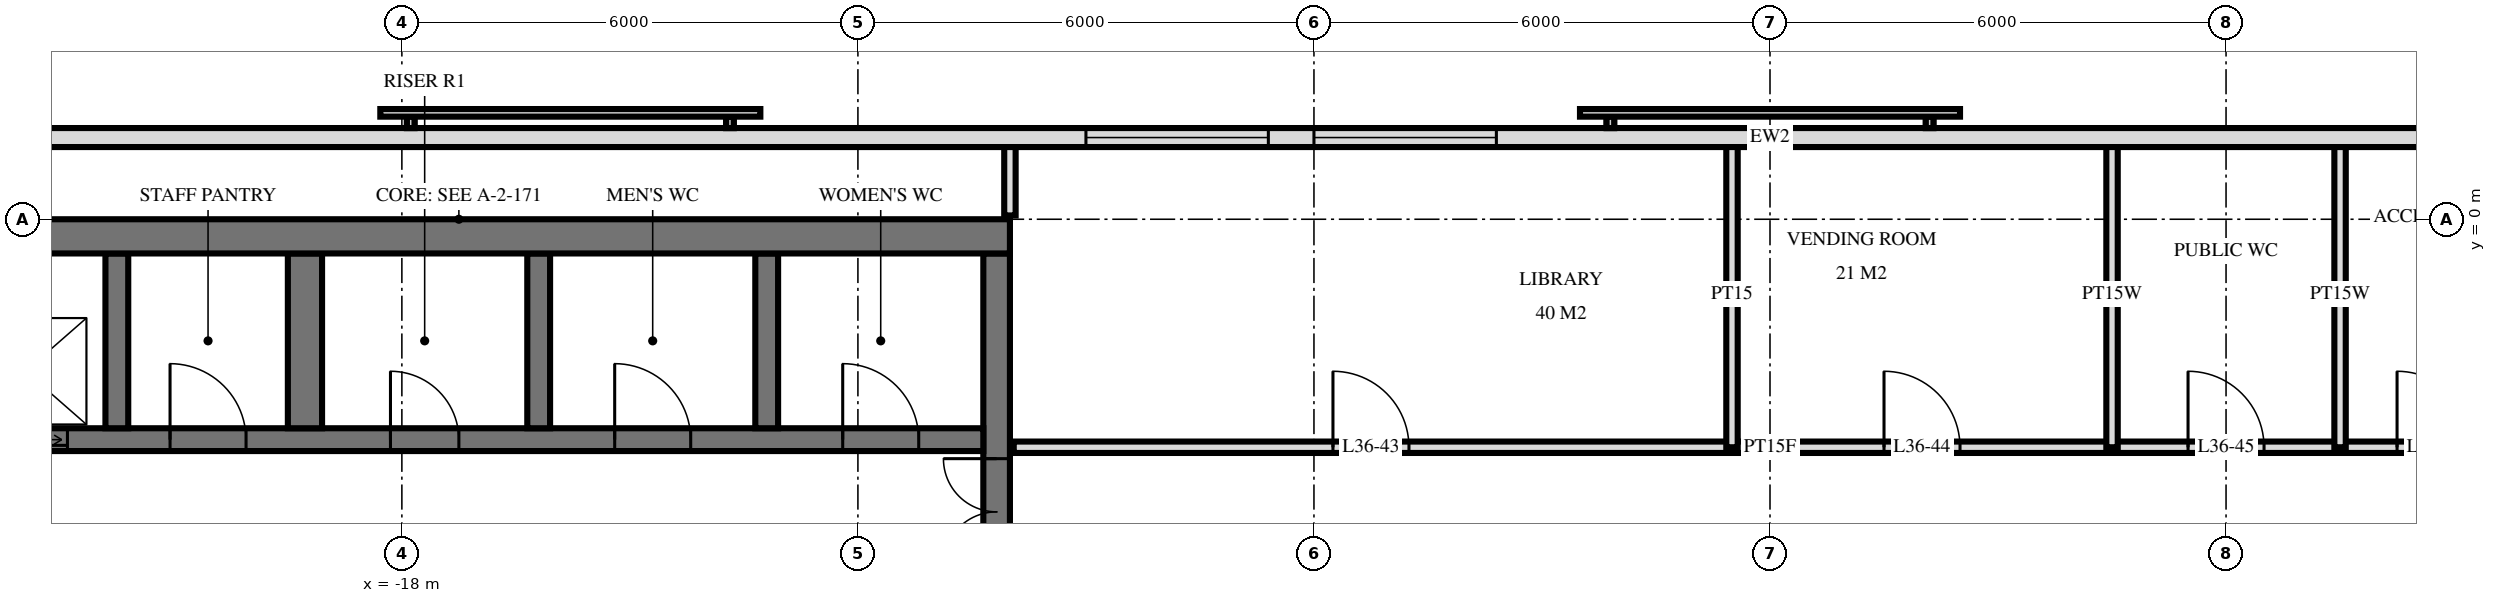
"""IFC4 building model, lengths in metres.
Left out: names, types, materials, properties, quantities, classifications, styles, units other than length and angle.
Written with IfcOpenShell. Run it as: python <this file> out.ifc"""

import sys

from ifc_helpers import new_model, si_unit, direction, frame, frame_2d, origin, place, context, subcontext, project, spatial, rectangle, extrude, element, fill, save


model = new_model("IFC4")
c1 = context("Model", 3, precision=1e-05, world=origin(), true_north=direction((0.0, 1.0)))
c2 = subcontext(c1, "Body", "Model", "MODEL_VIEW")
j1 = project(units=[si_unit("LENGTHUNIT", "METRE"), si_unit("PLANEANGLEUNIT", "RADIAN")], contexts=[c1])
p1 = place(None, origin())
s1 = spatial("IfcSite", under=j1, at=p1, CompositionType="ELEMENT")
p2 = place(p1, origin())
s2 = spatial("IfcBuilding", under=s1, at=p2, CompositionType="ELEMENT")
p3 = place(p2, frame((0.0, 0.0, 141.6)))
s3 = spatial("IfcBuildingStorey", under=s2, at=p3, CompositionType="ELEMENT", Elevation=141.6)
p4 = place(p3, frame((-24.5, -0.225, 0.0), z_axis=(0.0, 0.0, 1.0), x_axis=(1.0, 0.0, 0.0)))
e1 = element("IfcWall", 1, at=p4, inside=s3, PredefinedType="SHEAR", context=c2, shape_type="SweptSolid", body=[
    extrude(rectangle(XDim=14.5, YDim=0.45, at=frame_2d((7.25, 0.0))), origin(), (0.0, 0.0, 1.0), 3.6),
])
p5 = place(p3, frame((-10.175, -14.55, 0.0), z_axis=(0.0, 0.0, 1.0), x_axis=(0.0, 1.0, 0.0)))
e2 = element("IfcWall", 2, at=p5, inside=s3, PredefinedType="SHEAR", context=c2, shape_type="SweptSolid", body=[
    extrude(rectangle(XDim=14.1, YDim=0.35, at=frame_2d((7.05, 0.0))), origin(), (0.0, 0.0, 1.0), 3.6),
])
p6 = place(p5, frame((8.4, 0.0, 0.0)))
e3 = element("IfcOpeningElement", 3, at=p6, cuts=e2, PredefinedType="OPENING", context=c2, shape_type="SweptSolid", body=[
    extrude(rectangle(XDim=1.4, YDim=2.4, at=frame_2d((0.7, 1.2))), frame((0.0, 0.185, 0.0), z_axis=(0.0, -1.0, 0.0), x_axis=(1.0, 0.0, 0.0)), (0.0, 0.0, 1.0), 0.37),
])
p7 = place(p5, frame((10.0, 0.0, 0.0)))
e4 = element("IfcOpeningElement", 4, at=p7, cuts=e2, PredefinedType="OPENING", context=c2, shape_type="SweptSolid", body=[
    extrude(rectangle(XDim=1.4, YDim=2.4, at=frame_2d((0.7, 1.2))), frame((0.0, 0.185, 0.0), z_axis=(0.0, -1.0, 0.0), x_axis=(1.0, 0.0, 0.0)), (0.0, 0.0, 1.0), 0.37),
])
p8 = place(p5, frame((4.0, 0.0, 0.0)))
e5 = element("IfcOpeningElement", 5, at=p8, cuts=e2, PredefinedType="OPENING", context=c2, shape_type="SweptSolid", body=[
    extrude(rectangle(XDim=1.2, YDim=2.1, at=frame_2d((0.6, 1.05))), frame((0.0, 0.185, 0.0), z_axis=(0.0, -1.0, 0.0), x_axis=(1.0, 0.0, 0.0)), (0.0, 0.0, 1.0), 0.37),
])
p9 = place(p3, frame((-24.05, -2.9, 0.0), z_axis=(0.0, 0.0, 1.0), x_axis=(1.0, 0.0, 0.0)))
e6 = element("IfcWall", 6, at=p9, inside=s3, PredefinedType="SHEAR", context=c2, shape_type="SweptSolid", body=[
    extrude(rectangle(XDim=13.7, YDim=0.3, at=frame_2d((6.85, 0.0))), origin(), (0.0, 0.0, 1.0), 3.6),
])
p10 = place(p9, frame((0.55, 0.0, 0.0)))
e7 = element("IfcOpeningElement", 7, at=p10, cuts=e6, PredefinedType="OPENING", context=c2, shape_type="SweptSolid", body=[
    extrude(rectangle(XDim=1.1, YDim=2.1, at=frame_2d((0.55, 1.05))), frame((0.0, 0.16, 0.0), z_axis=(0.0, -1.0, 0.0), x_axis=(1.0, 0.0, 0.0)), (0.0, 0.0, 1.0), 0.32),
])
p11 = place(p9, frame((5.9, 0.0, 0.0)))
e8 = element("IfcOpeningElement", 8, at=p11, cuts=e6, PredefinedType="OPENING", context=c2, shape_type="SweptSolid", body=[
    extrude(rectangle(XDim=0.9, YDim=2.1, at=frame_2d((0.45, 1.05))), frame((0.0, 0.16, 0.0), z_axis=(0.0, -1.0, 0.0), x_axis=(1.0, 0.0, 0.0)), (0.0, 0.0, 1.0), 0.32),
])
p12 = place(p9, frame((11.85, 0.0, 0.0)))
e9 = element("IfcOpeningElement", 9, at=p12, cuts=e6, PredefinedType="OPENING", context=c2, shape_type="SweptSolid", body=[
    extrude(rectangle(XDim=1.0, YDim=2.1, at=frame_2d((0.5, 1.05))), frame((0.0, 0.16, 0.0), z_axis=(0.0, -1.0, 0.0), x_axis=(1.0, 0.0, 0.0)), (0.0, 0.0, 1.0), 0.32),
])
p13 = place(p9, frame((8.85, 0.0, 0.0)))
e10 = element("IfcOpeningElement", 10, at=p13, cuts=e6, PredefinedType="OPENING", context=c2, shape_type="SweptSolid", body=[
    extrude(rectangle(XDim=1.0, YDim=2.1, at=frame_2d((0.5, 1.05))), frame((0.0, 0.16, 0.0), z_axis=(0.0, -1.0, 0.0), x_axis=(1.0, 0.0, 0.0)), (0.0, 0.0, 1.0), 0.32),
])
p14 = place(p9, frame((3.0, 0.0, 0.0)))
e11 = element("IfcOpeningElement", 11, at=p14, cuts=e6, PredefinedType="OPENING", context=c2, shape_type="SweptSolid", body=[
    extrude(rectangle(XDim=1.0, YDim=2.1, at=frame_2d((0.5, 1.05))), frame((0.0, 0.16, 0.0), z_axis=(0.0, -1.0, 0.0), x_axis=(1.0, 0.0, 0.0)), (0.0, 0.0, 1.0), 0.32),
])
for number, where, z_axis, x_axis in (
    (12, (-13.2, -2.75, 0.0), (0.0, 0.0, 1.0), (0.0, 1.0, 0.0)),
    (13, (-16.2, -2.75, 0.0), (0.0, 0.0, 1.0), (0.0, 1.0, 0.0)),
):
    element("IfcWall", number, at=place(p3, frame(where, z_axis=z_axis, x_axis=x_axis)), inside=s3, PredefinedType="SHEAR", context=c2, shape_type="SweptSolid", body=[
        extrude(rectangle(XDim=2.3, YDim=0.3, at=frame_2d((1.15, 0.0))), origin(), (0.0, 0.0, 1.0), 3.6),
    ])
p15 = place(p3, frame((-19.275, -2.75, 0.0), z_axis=(0.0, 0.0, 1.0), x_axis=(0.0, 1.0, 0.0)))
e14 = element("IfcWall", 14, at=p15, inside=s3, PredefinedType="SHEAR", context=c2, shape_type="SweptSolid", body=[
    extrude(rectangle(XDim=2.3, YDim=0.45, at=frame_2d((1.15, 0.0))), origin(), (0.0, 0.0, 1.0), 3.6),
])
p16 = place(p3, frame((-21.75, -2.75, 0.0), z_axis=(0.0, 0.0, 1.0), x_axis=(0.0, 1.0, 0.0)))
e15 = element("IfcWall", 15, at=p16, inside=s3, PredefinedType="SHEAR", context=c2, shape_type="SweptSolid", body=[
    extrude(rectangle(XDim=2.3, YDim=0.3, at=frame_2d((1.15, 0.0))), origin(), (0.0, 0.0, 1.0), 3.6),
])
p17 = place(p3, frame((23.675, 1.075, 0.0), z_axis=(0.0, 0.0, 1.0), x_axis=(-1.0, 0.0, 0.0)))
e16 = element("IfcWall", 16, at=p17, inside=s3, PredefinedType="SOLIDWALL", context=c2, shape_type="SweptSolid", body=[
    extrude(rectangle(XDim=47.351, YDim=0.25, at=frame_2d((23.675, 0.0))), origin(), (0.0, 0.0, 1.0), 3.32),
])
p18 = place(p17, frame((27.275, 0.0, 0.3)))
e17 = element("IfcOpeningElement", 17, at=p18, cuts=e16, PredefinedType="OPENING", context=c2, shape_type="SweptSolid", body=[
    extrude(rectangle(XDim=2.4, YDim=2.1, at=frame_2d((1.2, 1.05))), frame((0.0, 0.135, 0.0), z_axis=(0.0, -1.0, 0.0), x_axis=(1.0, 0.0, 0.0)), (0.0, 0.0, 1.0), 0.27),
])
p19 = place(p17, frame((30.275, 0.0, 0.3)))
e18 = element("IfcOpeningElement", 18, at=p19, cuts=e16, PredefinedType="OPENING", context=c2, shape_type="SweptSolid", body=[
    extrude(rectangle(XDim=2.4, YDim=2.1, at=frame_2d((1.2, 1.05))), frame((0.0, 0.135, 0.0), z_axis=(0.0, -1.0, 0.0), x_axis=(1.0, 0.0, 0.0)), (0.0, 0.0, 1.0), 0.27),
])
for number, where, z_axis, x_axis in (
    (19, (7.5, -3.0, 0.0), (0.0, 0.0, 1.0), (0.0, 1.0, 0.0)),
    (20, (4.5, -3.0, 0.0), (0.0, 0.0, 1.0), (0.0, 1.0, 0.0)),
):
    element("IfcWall", number, at=place(p3, frame(where, z_axis=z_axis, x_axis=x_axis)), inside=s3, PredefinedType="PLUMBINGWALL", context=c2, shape_type="SweptSolid", body=[
        extrude(rectangle(XDim=4.02, YDim=0.15, at=frame_2d((2.01, 0.0))), origin(), (0.0, 0.0, 1.0), 3.32),
    ])
p20 = place(p3, frame((-0.5, -3.0, 0.0), z_axis=(0.0, 0.0, 1.0), x_axis=(0.0, 1.0, 0.0)))
e21 = element("IfcWall", 21, at=p20, inside=s3, PredefinedType="PARTITIONING", context=c2, shape_type="SweptSolid", body=[
    extrude(rectangle(XDim=4.02, YDim=0.15, at=frame_2d((2.01, 0.0))), origin(), (0.0, 0.0, 1.0), 3.32),
])
p21 = place(p3, frame((-10.0, 0.05, 0.0), z_axis=(0.0, 0.0, 1.0), x_axis=(0.0, 1.0, 0.0)))
e22 = element("IfcWall", 22, at=p21, inside=s3, PredefinedType="PARTITIONING", context=c2, shape_type="SweptSolid", body=[
    extrude(rectangle(XDim=0.97, YDim=0.15, at=frame_2d((0.485, 0.0))), origin(), (0.0, 0.0, 1.0), 3.32),
])
p22 = place(p3, frame((-9.95, -3.0, 0.0), z_axis=(0.0, 0.0, 1.0), x_axis=(1.0, 0.0, 0.0)))
e23 = element("IfcWall", 23, at=p22, inside=s3, PredefinedType="PARTITIONING", context=c2, shape_type="SweptSolid", body=[
    extrude(rectangle(XDim=19.9, YDim=0.15, at=frame_2d((9.95, 0.0))), origin(), (0.0, 0.0, 1.0), 3.32),
])
p23 = place(p22, frame((4.2, 0.0, 0.0)))
e24 = element("IfcOpeningElement", 24, at=p23, cuts=e23, PredefinedType="OPENING", context=c2, shape_type="SweptSolid", body=[
    extrude(rectangle(XDim=1.0, YDim=2.1, at=frame_2d((0.5, 1.05))), frame((0.0, 0.085, 0.0), z_axis=(0.0, -1.0, 0.0), x_axis=(1.0, 0.0, 0.0)), (0.0, 0.0, 1.0), 0.17),
])
p24 = place(p22, frame((11.45, 0.0, 0.0)))
e25 = element("IfcOpeningElement", 25, at=p24, cuts=e23, PredefinedType="OPENING", context=c2, shape_type="SweptSolid", body=[
    extrude(rectangle(XDim=1.0, YDim=2.1, at=frame_2d((0.5, 1.05))), frame((0.0, 0.085, 0.0), z_axis=(0.0, -1.0, 0.0), x_axis=(1.0, 0.0, 0.0)), (0.0, 0.0, 1.0), 0.17),
])
p25 = place(p22, frame((15.45, 0.0, 0.0)))
e26 = element("IfcOpeningElement", 26, at=p25, cuts=e23, PredefinedType="OPENING", context=c2, shape_type="SweptSolid", body=[
    extrude(rectangle(XDim=1.0, YDim=2.1, at=frame_2d((0.5, 1.05))), frame((0.0, 0.085, 0.0), z_axis=(0.0, -1.0, 0.0), x_axis=(1.0, 0.0, 0.0)), (0.0, 0.0, 1.0), 0.17),
])
p26 = place(p22, frame((18.2, 0.0, 0.0)))
e27 = element("IfcOpeningElement", 27, at=p26, cuts=e23, PredefinedType="OPENING", context=c2, shape_type="SweptSolid", body=[
    extrude(rectangle(XDim=1.0, YDim=2.1, at=frame_2d((0.5, 1.05))), frame((0.0, 0.085, 0.0), z_axis=(0.0, -1.0, 0.0), x_axis=(1.0, 0.0, 0.0)), (0.0, 0.0, 1.0), 0.17),
])
p27 = place(p18, origin())
e28 = element("IfcWindow", 28, at=p27, inside=s3, PartitioningType="SINGLE_PANEL", PredefinedType="WINDOW", context=c2, shape_type="SweptSolid", body=[
    extrude(rectangle(XDim=2.4, YDim=2.1, at=frame_2d((1.2, 1.05))), frame((0.0, 0.03, 0.0), z_axis=(0.0, -1.0, 0.0), x_axis=(1.0, 0.0, 0.0)), (0.0, 0.0, 1.0), 0.06),
])
fill(e17, e28)
p28 = place(p19, origin())
e29 = element("IfcWindow", 29, at=p28, inside=s3, PartitioningType="SINGLE_PANEL", PredefinedType="WINDOW", context=c2, shape_type="SweptSolid", body=[
    extrude(rectangle(XDim=2.4, YDim=2.1, at=frame_2d((1.2, 1.05))), frame((0.0, 0.03, 0.0), z_axis=(0.0, -1.0, 0.0), x_axis=(1.0, 0.0, 0.0)), (0.0, 0.0, 1.0), 0.06),
])
fill(e18, e29)
p29 = place(p10, origin())
e30 = element("IfcDoor", 30, at=p29, inside=s3, OperationType="DOUBLE_DOOR_SLIDING", PredefinedType="USERDEFINED", context=c2, shape_type="SweptSolid", body=[
    extrude(rectangle(XDim=1.1, YDim=2.1, at=frame_2d((0.55, 1.05))), frame((0.0, 0.025, 0.0), z_axis=(0.0, -1.0, 0.0), x_axis=(1.0, 0.0, 0.0)), (0.0, 0.0, 1.0), 0.05),
])
fill(e7, e30)
p30 = place(p7, origin())
e31 = element("IfcDoor", 31, at=p30, inside=s3, OperationType="DOUBLE_DOOR_SINGLE_SWING", PredefinedType="DOOR", context=c2, shape_type="SweptSolid", body=[
    extrude(rectangle(XDim=1.4, YDim=2.4, at=frame_2d((0.7, 1.2))), frame((0.0, 0.025, 0.0), z_axis=(0.0, -1.0, 0.0), x_axis=(1.0, 0.0, 0.0)), (0.0, 0.0, 1.0), 0.05),
])
fill(e4, e31)
p31 = place(p11, origin())
e32 = element("IfcDoor", 32, at=p31, inside=s3, OperationType="SINGLE_SWING_RIGHT", PredefinedType="DOOR", context=c2, shape_type="SweptSolid", body=[
    extrude(rectangle(XDim=0.9, YDim=2.1, at=frame_2d((0.45, 1.05))), frame((0.0, 0.025, 0.0), z_axis=(0.0, -1.0, 0.0), x_axis=(1.0, 0.0, 0.0)), (0.0, 0.0, 1.0), 0.05),
])
fill(e8, e32)
p32 = place(p12, origin())
e33 = element("IfcDoor", 33, at=p32, inside=s3, OperationType="SINGLE_SWING_RIGHT", PredefinedType="DOOR", context=c2, shape_type="SweptSolid", body=[
    extrude(rectangle(XDim=1.0, YDim=2.1, at=frame_2d((0.5, 1.05))), frame((0.0, 0.025, 0.0), z_axis=(0.0, -1.0, 0.0), x_axis=(1.0, 0.0, 0.0)), (0.0, 0.0, 1.0), 0.05),
])
fill(e9, e33)
p33 = place(p13, origin())
e34 = element("IfcDoor", 34, at=p33, inside=s3, OperationType="SINGLE_SWING_RIGHT", PredefinedType="DOOR", context=c2, shape_type="SweptSolid", body=[
    extrude(rectangle(XDim=1.0, YDim=2.1, at=frame_2d((0.5, 1.05))), frame((0.0, 0.025, 0.0), z_axis=(0.0, -1.0, 0.0), x_axis=(1.0, 0.0, 0.0)), (0.0, 0.0, 1.0), 0.05),
])
fill(e10, e34)
p34 = place(p14, origin())
e35 = element("IfcDoor", 35, at=p34, inside=s3, OperationType="SINGLE_SWING_RIGHT", PredefinedType="DOOR", context=c2, shape_type="SweptSolid", body=[
    extrude(rectangle(XDim=1.0, YDim=2.1, at=frame_2d((0.5, 1.05))), frame((0.0, 0.025, 0.0), z_axis=(0.0, -1.0, 0.0), x_axis=(1.0, 0.0, 0.0)), (0.0, 0.0, 1.0), 0.05),
])
fill(e11, e35)
p35 = place(p23, origin())
e36 = element("IfcDoor", 36, at=p35, inside=s3, OperationType="SINGLE_SWING_RIGHT", PredefinedType="DOOR", context=c2, shape_type="SweptSolid", body=[
    extrude(rectangle(XDim=1.0, YDim=2.1, at=frame_2d((0.5, 1.05))), frame((0.0, 0.025, 0.0), z_axis=(0.0, -1.0, 0.0), x_axis=(1.0, 0.0, 0.0)), (0.0, 0.0, 1.0), 0.05),
])
fill(e24, e36)
p36 = place(p24, origin())
e37 = element("IfcDoor", 37, at=p36, inside=s3, OperationType="SINGLE_SWING_RIGHT", PredefinedType="DOOR", context=c2, shape_type="SweptSolid", body=[
    extrude(rectangle(XDim=1.0, YDim=2.1, at=frame_2d((0.5, 1.05))), frame((0.0, 0.025, 0.0), z_axis=(0.0, -1.0, 0.0), x_axis=(1.0, 0.0, 0.0)), (0.0, 0.0, 1.0), 0.05),
])
fill(e25, e37)
p37 = place(p25, origin())
e38 = element("IfcDoor", 38, at=p37, inside=s3, OperationType="SINGLE_SWING_RIGHT", PredefinedType="DOOR", context=c2, shape_type="SweptSolid", body=[
    extrude(rectangle(XDim=1.0, YDim=2.1, at=frame_2d((0.5, 1.05))), frame((0.0, 0.025, 0.0), z_axis=(0.0, -1.0, 0.0), x_axis=(1.0, 0.0, 0.0)), (0.0, 0.0, 1.0), 0.05),
])
fill(e26, e38)
p38 = place(p26, origin())
e39 = element("IfcDoor", 39, at=p38, inside=s3, OperationType="SINGLE_SWING_RIGHT", PredefinedType="DOOR", context=c2, shape_type="SweptSolid", body=[
    extrude(rectangle(XDim=1.0, YDim=2.1, at=frame_2d((0.5, 1.05))), frame((0.0, 0.025, 0.0), z_axis=(0.0, -1.0, 0.0), x_axis=(1.0, 0.0, 0.0)), (0.0, 0.0, 1.0), 0.05),
])
fill(e27, e39)
save(model, sys.argv[1])
